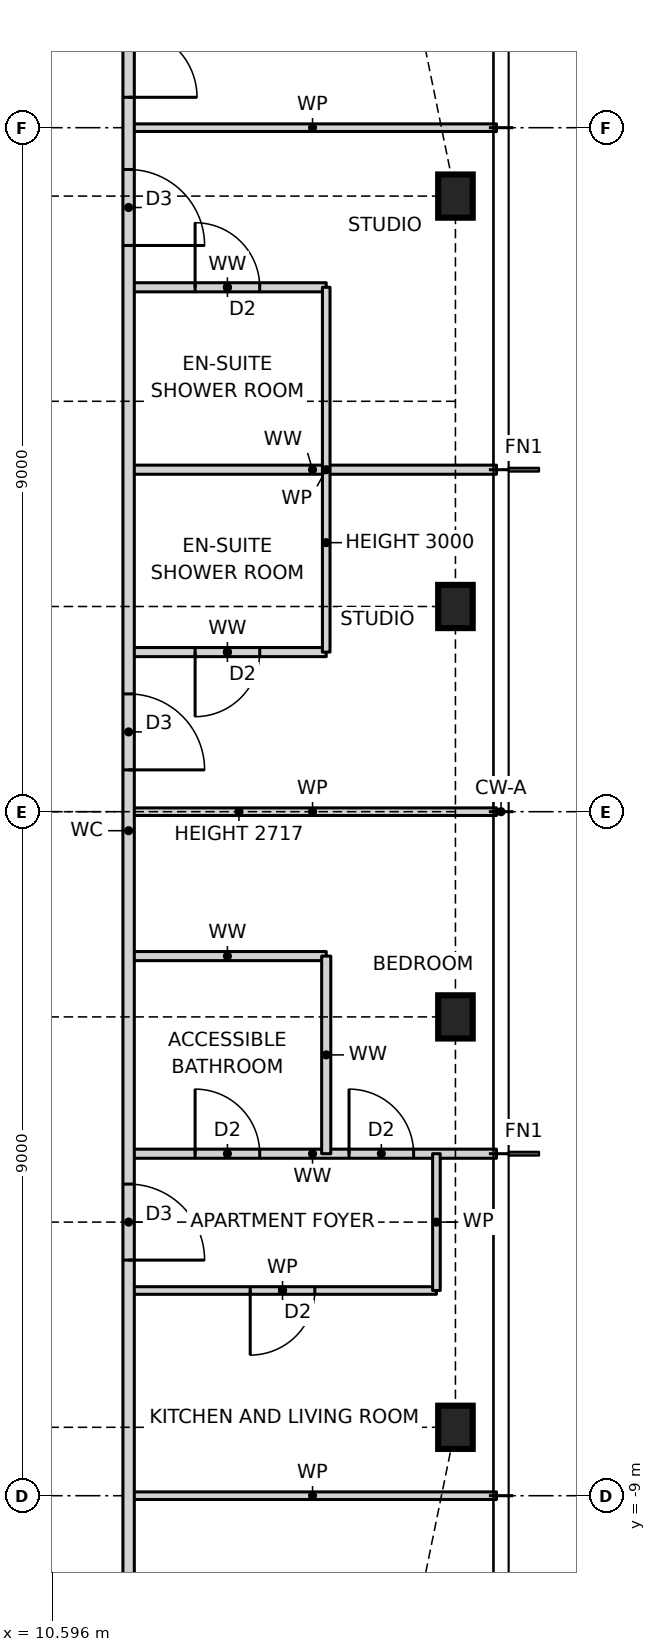
"""IFC4 building model, lengths in metres.
Left out: names, types, materials, properties, quantities, classifications, styles, units other than length and angle.
Written with IfcOpenShell. Run it as: python <this file> out.ifc"""

import sys

from ifc_helpers import new_model, si_unit, direction, frame, frame_2d, origin, origin_2d, place, context, subcontext, project, spatial, rectangle, i_section, extrude, element, fill, save


model = new_model("IFC4")
c1 = context("Model", 3, precision=1e-05, world=origin(), true_north=direction((0.0, 1.0)))
c2 = subcontext(c1, "Body", "Model", "MODEL_VIEW")
j1 = project(units=[si_unit("LENGTHUNIT", "METRE"), si_unit("PLANEANGLEUNIT", "RADIAN")], contexts=[c1])
p1 = place(None, origin())
s1 = spatial("IfcSite", under=j1, at=p1, CompositionType="ELEMENT")
p2 = place(p1, origin())
s2 = spatial("IfcBuilding", under=s1, at=p2, CompositionType="ELEMENT")
p3 = place(p2, frame((0.0, 0.0, 264.0)))
s3 = spatial("IfcBuildingStorey", under=s2, at=p3, CompositionType="ELEMENT", Elevation=264.0)
for number, where, z_axis, x_axis in (
    (1, (15.9, -8.1, 0.0), (0.0, 0.0, 1.0), (1.0, 0.0, 0.0)),
    (2, (15.9, -2.7, 0.0), (0.0, 0.0, 1.0), (1.0, 0.0, 0.0)),
    (3, (15.9, 2.7, 0.0), (0.0, 0.0, 1.0), (1.0, 0.0, 0.0)),
    (4, (15.9, 8.1, 0.0), (0.0, 0.0, 1.0), (1.0, 0.0, 0.0)),
):
    element("IfcColumn", number, at=place(p3, frame(where, z_axis=z_axis, x_axis=x_axis)), inside=s3, PredefinedType="COLUMN", context=c2, shape_type="SweptSolid", body=[
        extrude(i_section(OverallWidth=0.455, OverallDepth=0.569, WebThickness=0.078, FlangeThickness=0.125, at=origin_2d()), origin(), (0.0, 0.0, 1.0), 3.5),
    ])
p4 = place(p3, frame((11.6, -9.0, 0.0), z_axis=(0.0, 0.0, 1.0), x_axis=(1.0, 0.0, 0.0)))
e5 = element("IfcWall", 5, at=p4, inside=s3, PredefinedType="PARTITIONING", context=c2, shape_type="SweptSolid", body=[
    extrude(rectangle(XDim=4.84, YDim=0.1, at=frame_2d((2.42, 0.0))), origin(), (0.0, 0.0, 1.0), 3.25),
])
p5 = place(p3, frame((11.6, -6.3, 0.0), z_axis=(0.0, 0.0, 1.0), x_axis=(1.0, 0.0, 0.0)))
e6 = element("IfcWall", 6, at=p5, inside=s3, PredefinedType="PARTITIONING", context=c2, shape_type="SweptSolid", body=[
    extrude(rectangle(XDim=4.05, YDim=0.1, at=frame_2d((2.025, 0.0))), origin(), (0.0, 0.0, 1.0), 3.25),
])
p6 = place(p5, frame((1.6, 0.0, 0.0)))
e7 = element("IfcOpeningElement", 7, at=p6, cuts=e6, PredefinedType="OPENING", context=c2, shape_type="SweptSolid", body=[
    extrude(rectangle(XDim=0.85, YDim=2.1, at=frame_2d((0.425, 1.05))), frame((0.0, 0.06, 0.0), z_axis=(0.0, -1.0, 0.0), x_axis=(1.0, 0.0, 0.0)), (0.0, 0.0, 1.0), 0.12),
])
p7 = place(p3, frame((11.6, -4.5, 0.0), z_axis=(0.0, 0.0, 1.0), x_axis=(1.0, 0.0, 0.0)))
e8 = element("IfcWall", 8, at=p7, inside=s3, PredefinedType="PARTITIONING", context=c2, shape_type="SweptSolid", body=[
    extrude(rectangle(XDim=4.84, YDim=0.12, at=frame_2d((2.42, 0.0))), origin(), (0.0, 0.0, 1.0), 3.25),
])
p8 = place(p7, frame((2.9, 0.0, 0.0)))
e9 = element("IfcOpeningElement", 9, at=p8, cuts=e8, PredefinedType="OPENING", context=c2, shape_type="SweptSolid", body=[
    extrude(rectangle(XDim=0.85, YDim=2.1, at=frame_2d((0.425, 1.05))), frame((0.0, 0.07, 0.0), z_axis=(0.0, -1.0, 0.0), x_axis=(1.0, 0.0, 0.0)), (0.0, 0.0, 1.0), 0.14),
])
p9 = place(p7, frame((0.875, 0.0, 0.0)))
e10 = element("IfcOpeningElement", 10, at=p9, cuts=e8, PredefinedType="OPENING", context=c2, shape_type="SweptSolid", body=[
    extrude(rectangle(XDim=0.85, YDim=2.1, at=frame_2d((0.425, 1.05))), frame((0.0, 0.07, 0.0), z_axis=(0.0, -1.0, 0.0), x_axis=(1.0, 0.0, 0.0)), (0.0, 0.0, 1.0), 0.14),
])
p10 = place(p3, frame((11.6, -1.9, 0.0), z_axis=(0.0, 0.0, 1.0), x_axis=(1.0, 0.0, 0.0)))
e11 = element("IfcWall", 11, at=p10, inside=s3, PredefinedType="PARTITIONING", context=c2, shape_type="SweptSolid", body=[
    extrude(rectangle(XDim=2.6, YDim=0.12, at=frame_2d((1.3, 0.0))), origin(), (0.0, 0.0, 1.0), 3.25),
])
p11 = place(p3, frame((11.6, 0.0, 0.0), z_axis=(0.0, 0.0, 1.0), x_axis=(1.0, 0.0, 0.0)))
e12 = element("IfcWall", 12, at=p11, inside=s3, PredefinedType="PARTITIONING", context=c2, shape_type="SweptSolid", body=[
    extrude(rectangle(XDim=4.84, YDim=0.1, at=frame_2d((2.42, 0.0))), origin(), (0.0, 0.0, 1.0), 2.717),
])
p12 = place(p3, frame((11.6, 2.1, 0.0), z_axis=(0.0, 0.0, 1.0), x_axis=(1.0, 0.0, 0.0)))
e13 = element("IfcWall", 13, at=p12, inside=s3, PredefinedType="PARTITIONING", context=c2, shape_type="SweptSolid", body=[
    extrude(rectangle(XDim=2.6, YDim=0.12, at=frame_2d((1.3, 0.0))), origin(), (0.0, 0.0, 1.0), 3.25),
])
p13 = place(p12, frame((0.875, 0.0, 0.0)))
e14 = element("IfcOpeningElement", 14, at=p13, cuts=e13, PredefinedType="OPENING", context=c2, shape_type="SweptSolid", body=[
    extrude(rectangle(XDim=0.85, YDim=2.1, at=frame_2d((0.425, 1.05))), frame((0.0, 0.07, 0.0), z_axis=(0.0, -1.0, 0.0), x_axis=(1.0, 0.0, 0.0)), (0.0, 0.0, 1.0), 0.14),
])
p14 = place(p3, frame((11.6, 4.5, 0.0), z_axis=(0.0, 0.0, 1.0), x_axis=(1.0, 0.0, 0.0)))
e15 = element("IfcWall", 15, at=p14, inside=s3, PredefinedType="PARTITIONING", context=c2, shape_type="SweptSolid", body=[
    extrude(rectangle(XDim=4.84, YDim=0.12, at=frame_2d((2.42, 0.0))), origin(), (0.0, 0.0, 1.0), 3.25),
])
p15 = place(p3, frame((11.6, 6.9, 0.0), z_axis=(0.0, 0.0, 1.0), x_axis=(1.0, 0.0, 0.0)))
e16 = element("IfcWall", 16, at=p15, inside=s3, PredefinedType="PARTITIONING", context=c2, shape_type="SweptSolid", body=[
    extrude(rectangle(XDim=2.6, YDim=0.12, at=frame_2d((1.3, 0.0))), origin(), (0.0, 0.0, 1.0), 3.25),
])
p16 = place(p15, frame((0.875, 0.0, 0.0)))
e17 = element("IfcOpeningElement", 17, at=p16, cuts=e16, PredefinedType="OPENING", context=c2, shape_type="SweptSolid", body=[
    extrude(rectangle(XDim=0.85, YDim=2.1, at=frame_2d((0.425, 1.05))), frame((0.0, 0.07, 0.0), z_axis=(0.0, -1.0, 0.0), x_axis=(1.0, 0.0, 0.0)), (0.0, 0.0, 1.0), 0.14),
])
p17 = place(p3, frame((11.6, 9.0, 0.0), z_axis=(0.0, 0.0, 1.0), x_axis=(1.0, 0.0, 0.0)))
e18 = element("IfcWall", 18, at=p17, inside=s3, PredefinedType="PARTITIONING", context=c2, shape_type="SweptSolid", body=[
    extrude(rectangle(XDim=4.84, YDim=0.1, at=frame_2d((2.42, 0.0))), origin(), (0.0, 0.0, 1.0), 3.25),
])
p18 = place(p3, frame((15.65, -6.3, 0.0), z_axis=(0.0, 0.0, 1.0), x_axis=(0.0, 1.0, 0.0)))
e19 = element("IfcWall", 19, at=p18, inside=s3, PredefinedType="PARTITIONING", context=c2, shape_type="SweptSolid", body=[
    extrude(rectangle(XDim=1.8, YDim=0.1, at=frame_2d((0.9, 0.0))), origin(), (0.0, 0.0, 1.0), 3.25),
])
p19 = place(p3, frame((14.2, -4.5, 0.0), z_axis=(0.0, 0.0, 1.0), x_axis=(0.0, 1.0, 0.0)))
e20 = element("IfcWall", 20, at=p19, inside=s3, PredefinedType="PARTITIONING", context=c2, shape_type="SweptSolid", body=[
    extrude(rectangle(XDim=2.6, YDim=0.12, at=frame_2d((1.3, 0.0))), origin(), (0.0, 0.0, 1.0), 3.25),
])
p20 = place(p3, frame((14.2, 2.1, 0.0), z_axis=(0.0, 0.0, 1.0), x_axis=(0.0, 1.0, 0.0)))
e21 = element("IfcWall", 21, at=p20, inside=s3, PredefinedType="PARTITIONING", context=c2, shape_type="SweptSolid", body=[
    extrude(rectangle(XDim=4.8, YDim=0.1, at=frame_2d((2.4, 0.0))), origin(), (0.0, 0.0, 1.0), 3.0),
])
p21 = place(p3, frame((11.6, -12.1, 0.0), z_axis=(0.0, 0.0, 1.0), x_axis=(0.0, 1.0, 0.0)))
e22 = element("IfcWall", 22, at=p21, inside=s3, PredefinedType="PARTITIONING", context=c2, shape_type="SweptSolid", body=[
    extrude(rectangle(XDim=23.7, YDim=0.15, at=frame_2d((11.85, 0.0))), origin(), (0.0, 0.0, 1.0), 3.25),
])
p22 = place(p21, frame((6.2, 0.0, 0.0)))
e23 = element("IfcOpeningElement", 23, at=p22, cuts=e22, PredefinedType="OPENING", context=c2, shape_type="SweptSolid", body=[
    extrude(rectangle(XDim=1.0, YDim=2.1, at=frame_2d((0.5, 1.05))), frame((0.0, 0.085, 0.0), z_axis=(0.0, -1.0, 0.0), x_axis=(1.0, 0.0, 0.0)), (0.0, 0.0, 1.0), 0.17),
])
p23 = place(p21, frame((12.65, 0.0, 0.0)))
e24 = element("IfcOpeningElement", 24, at=p23, cuts=e22, PredefinedType="OPENING", context=c2, shape_type="SweptSolid", body=[
    extrude(rectangle(XDim=1.0, YDim=2.1, at=frame_2d((0.5, 1.05))), frame((0.0, 0.085, 0.0), z_axis=(0.0, -1.0, 0.0), x_axis=(1.0, 0.0, 0.0)), (0.0, 0.0, 1.0), 0.17),
])
p24 = place(p21, frame((19.55, 0.0, 0.0)))
e25 = element("IfcOpeningElement", 25, at=p24, cuts=e22, PredefinedType="OPENING", context=c2, shape_type="SweptSolid", body=[
    extrude(rectangle(XDim=1.0, YDim=2.1, at=frame_2d((0.5, 1.05))), frame((0.0, 0.085, 0.0), z_axis=(0.0, -1.0, 0.0), x_axis=(1.0, 0.0, 0.0)), (0.0, 0.0, 1.0), 0.17),
])
p25 = place(p21, frame((21.5, 0.0, 0.0)))
e26 = element("IfcOpeningElement", 26, at=p25, cuts=e22, PredefinedType="OPENING", context=c2, shape_type="SweptSolid", body=[
    extrude(rectangle(XDim=1.8, YDim=2.1, at=frame_2d((0.9, 1.05))), frame((0.0, 0.085, 0.0), z_axis=(0.0, -1.0, 0.0), x_axis=(1.0, 0.0, 0.0)), (0.0, 0.0, 1.0), 0.17),
])
p26 = place(p21, frame((1.125, 0.0, 0.0)))
e27 = element("IfcOpeningElement", 27, at=p26, cuts=e22, PredefinedType="OPENING", context=c2, shape_type="SweptSolid", body=[
    extrude(rectangle(XDim=0.85, YDim=2.1, at=frame_2d((0.425, 1.05))), frame((0.0, 0.085, 0.0), z_axis=(0.0, -1.0, 0.0), x_axis=(1.0, 0.0, 0.0)), (0.0, 0.0, 1.0), 0.17),
])
p27 = place(p22, frame((1.0, 0.0, 0.0), z_axis=(0.0, 0.0, 1.0), x_axis=(-1.0, 0.0, 0.0)))
e28 = element("IfcDoor", 28, at=p27, inside=s3, OperationType="SINGLE_SWING_RIGHT", PredefinedType="DOOR", context=c2, shape_type="SweptSolid", body=[
    extrude(rectangle(XDim=1.0, YDim=2.1, at=frame_2d((0.5, 1.05))), frame((0.0, 0.025, 0.0), z_axis=(0.0, -1.0, 0.0), x_axis=(1.0, 0.0, 0.0)), (0.0, 0.0, 1.0), 0.05),
])
fill(e23, e28)
p28 = place(p6, frame((0.85, 0.0, 0.0), z_axis=(0.0, 0.0, 1.0), x_axis=(-1.0, 0.0, 0.0)))
e29 = element("IfcDoor", 29, at=p28, inside=s3, OperationType="SINGLE_SWING_RIGHT", PredefinedType="DOOR", context=c2, shape_type="SweptSolid", body=[
    extrude(rectangle(XDim=0.85, YDim=2.1, at=frame_2d((0.425, 1.05))), frame((0.0, 0.025, 0.0), z_axis=(0.0, -1.0, 0.0), x_axis=(1.0, 0.0, 0.0)), (0.0, 0.0, 1.0), 0.05),
])
fill(e7, e29)
p29 = place(p8, origin())
e30 = element("IfcDoor", 30, at=p29, inside=s3, OperationType="SINGLE_SWING_LEFT", PredefinedType="DOOR", context=c2, shape_type="SweptSolid", body=[
    extrude(rectangle(XDim=0.85, YDim=2.1, at=frame_2d((0.425, 1.05))), frame((0.0, 0.025, 0.0), z_axis=(0.0, -1.0, 0.0), x_axis=(1.0, 0.0, 0.0)), (0.0, 0.0, 1.0), 0.05),
])
fill(e9, e30)
p30 = place(p9, origin())
e31 = element("IfcDoor", 31, at=p30, inside=s3, OperationType="SINGLE_SWING_LEFT", PredefinedType="DOOR", context=c2, shape_type="SweptSolid", body=[
    extrude(rectangle(XDim=0.85, YDim=2.1, at=frame_2d((0.425, 1.05))), frame((0.0, 0.025, 0.0), z_axis=(0.0, -1.0, 0.0), x_axis=(1.0, 0.0, 0.0)), (0.0, 0.0, 1.0), 0.05),
])
fill(e10, e31)
p31 = place(p23, frame((1.0, 0.0, 0.0), z_axis=(0.0, 0.0, 1.0), x_axis=(-1.0, 0.0, 0.0)))
e32 = element("IfcDoor", 32, at=p31, inside=s3, OperationType="SINGLE_SWING_RIGHT", PredefinedType="DOOR", context=c2, shape_type="SweptSolid", body=[
    extrude(rectangle(XDim=1.0, YDim=2.1, at=frame_2d((0.5, 1.05))), frame((0.0, 0.025, 0.0), z_axis=(0.0, -1.0, 0.0), x_axis=(1.0, 0.0, 0.0)), (0.0, 0.0, 1.0), 0.05),
])
fill(e24, e32)
p32 = place(p13, frame((0.85, 0.0, 0.0), z_axis=(0.0, 0.0, 1.0), x_axis=(-1.0, 0.0, 0.0)))
e33 = element("IfcDoor", 33, at=p32, inside=s3, OperationType="SINGLE_SWING_RIGHT", PredefinedType="DOOR", context=c2, shape_type="SweptSolid", body=[
    extrude(rectangle(XDim=0.85, YDim=2.1, at=frame_2d((0.425, 1.05))), frame((0.0, 0.025, 0.0), z_axis=(0.0, -1.0, 0.0), x_axis=(1.0, 0.0, 0.0)), (0.0, 0.0, 1.0), 0.05),
])
fill(e14, e33)
p33 = place(p24, frame((1.0, 0.0, 0.0), z_axis=(0.0, 0.0, 1.0), x_axis=(-1.0, 0.0, 0.0)))
e34 = element("IfcDoor", 34, at=p33, inside=s3, OperationType="SINGLE_SWING_RIGHT", PredefinedType="DOOR", context=c2, shape_type="SweptSolid", body=[
    extrude(rectangle(XDim=1.0, YDim=2.1, at=frame_2d((0.5, 1.05))), frame((0.0, 0.025, 0.0), z_axis=(0.0, -1.0, 0.0), x_axis=(1.0, 0.0, 0.0)), (0.0, 0.0, 1.0), 0.05),
])
fill(e25, e34)
p34 = place(p16, origin())
e35 = element("IfcDoor", 35, at=p34, inside=s3, OperationType="SINGLE_SWING_LEFT", PredefinedType="DOOR", context=c2, shape_type="SweptSolid", body=[
    extrude(rectangle(XDim=0.85, YDim=2.1, at=frame_2d((0.425, 1.05))), frame((0.0, 0.025, 0.0), z_axis=(0.0, -1.0, 0.0), x_axis=(1.0, 0.0, 0.0)), (0.0, 0.0, 1.0), 0.05),
])
fill(e17, e35)
p35 = place(p25, frame((1.8, 0.0, 0.0), z_axis=(0.0, 0.0, 1.0), x_axis=(-1.0, 0.0, 0.0)))
e36 = element("IfcDoor", 36, at=p35, inside=s3, OperationType="DOUBLE_DOOR_SINGLE_SWING", PredefinedType="DOOR", context=c2, shape_type="SweptSolid", body=[
    extrude(rectangle(XDim=1.8, YDim=2.1, at=frame_2d((0.9, 1.05))), frame((0.0, 0.025, 0.0), z_axis=(0.0, -1.0, 0.0), x_axis=(1.0, 0.0, 0.0)), (0.0, 0.0, 1.0), 0.05),
])
fill(e26, e36)
save(model, sys.argv[1])
